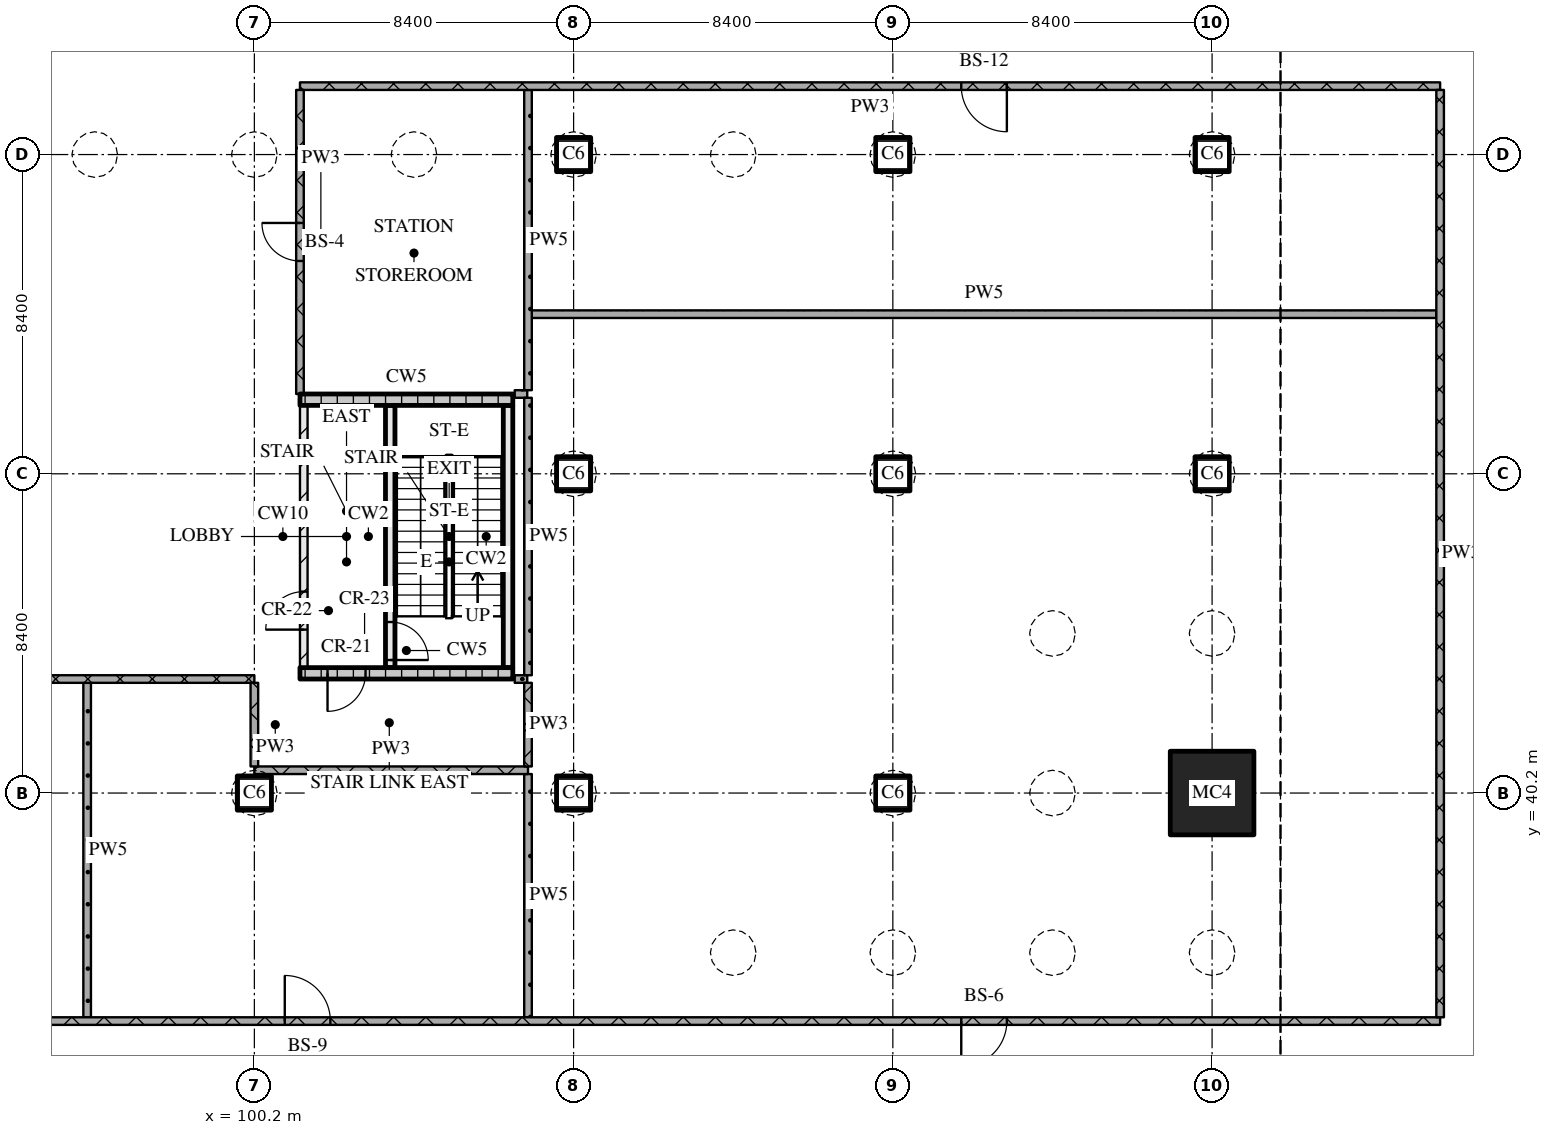
"""IFC4 building model, lengths in metres.
Left out: names, types, materials, properties, quantities, classifications, styles, units other than length and angle.
Written with IfcOpenShell. Run it as: python <this file> out.ifc"""

import sys

from ifc_helpers import new_model, si_unit, direction, frame, frame_2d, origin, origin_2d, place, context, subcontext, project, spatial, rectangle, extrude, element, fill, save


model = new_model("IFC4")
c1 = context("Model", 3, precision=1e-05, world=origin(), true_north=direction((0.0, 1.0)))
c2 = subcontext(c1, "Body", "Model", "MODEL_VIEW")
j1 = project(units=[si_unit("LENGTHUNIT", "METRE"), si_unit("PLANEANGLEUNIT", "RADIAN")], contexts=[c1])
p1 = place(None, origin())
s1 = spatial("IfcSite", under=j1, at=p1, CompositionType="ELEMENT")
p2 = place(p1, origin())
s2 = spatial("IfcBuilding", under=s1, at=p2, CompositionType="ELEMENT")
p3 = place(p2, frame((0.0, 0.0, -6.0)))
s3 = spatial("IfcBuildingStorey", under=s2, at=p3, CompositionType="ELEMENT", Elevation=-6.0)
for number, where, z_axis, x_axis in (
    (1, (100.2, 40.2, 0.0), (0.0, 0.0, 1.0), (1.0, 0.0, 0.0)),
    (2, (108.6, 40.2, 0.0), (0.0, 0.0, 1.0), (1.0, 0.0, 0.0)),
    (3, (108.6, 48.6, 0.0), (0.0, 0.0, 1.0), (1.0, 0.0, 0.0)),
    (4, (108.6, 57.0, 0.0), (0.0, 0.0, 1.0), (1.0, 0.0, 0.0)),
    (5, (117.0, 40.2, 0.0), (0.0, 0.0, 1.0), (1.0, 0.0, 0.0)),
    (6, (117.0, 48.6, 0.0), (0.0, 0.0, 1.0), (1.0, 0.0, 0.0)),
    (7, (117.0, 57.0, 0.0), (0.0, 0.0, 1.0), (1.0, 0.0, 0.0)),
):
    element("IfcColumn", number, at=place(p3, frame(where, z_axis=z_axis, x_axis=x_axis)), inside=s3, PredefinedType="COLUMN", context=c2, shape_type="SweptSolid", body=[
        extrude(rectangle(XDim=0.9, YDim=0.9, at=origin_2d()), origin(), (0.0, 0.0, 1.0), 6.0),
    ])
p4 = place(p3, frame((125.4, 40.2, 0.0), z_axis=(0.0, 0.0, 1.0), x_axis=(1.0, 0.0, 0.0)))
e8 = element("IfcColumn", 8, at=p4, inside=s3, PredefinedType="COLUMN", context=c2, shape_type="SweptSolid", body=[
    extrude(rectangle(XDim=2.2, YDim=2.2, at=origin_2d()), origin(), (0.0, 0.0, 1.0), 6.0),
])
for number, where, z_axis, x_axis in (
    (9, (125.4, 48.6, 0.0), (0.0, 0.0, 1.0), (1.0, 0.0, 0.0)),
    (10, (125.4, 57.0, 0.0), (0.0, 0.0, 1.0), (1.0, 0.0, 0.0)),
):
    element("IfcColumn", number, at=place(p3, frame(where, z_axis=z_axis, x_axis=x_axis)), inside=s3, PredefinedType="COLUMN", context=c2, shape_type="SweptSolid", body=[
        extrude(rectangle(XDim=0.9, YDim=0.9, at=origin_2d()), origin(), (0.0, 0.0, 1.0), 6.0),
    ])
p5 = place(p3, frame((101.4, 43.35, 0.0), z_axis=(0.0, 0.0, 1.0), x_axis=(1.0, 0.0, 0.0)))
e11 = element("IfcWall", 11, at=p5, inside=s3, PredefinedType="SOLIDWALL", context=c2, shape_type="SweptSolid", body=[
    extrude(rectangle(XDim=5.6, YDim=0.3, at=frame_2d((2.8, 0.0))), origin(), (0.0, 0.0, 1.0), 5.7),
])
p6 = place(p5, frame((0.725, 0.0, 0.0)))
e12 = element("IfcOpeningElement", 12, at=p6, cuts=e11, PredefinedType="OPENING", context=c2, shape_type="SweptSolid", body=[
    extrude(rectangle(XDim=1.0, YDim=2.1, at=frame_2d((0.5, 1.05))), frame((0.0, 0.16, 0.0), z_axis=(0.0, -1.0, 0.0), x_axis=(1.0, 0.0, 0.0)), (0.0, 0.0, 1.0), 0.32),
])
p7 = place(p3, frame((101.5, 43.5, 0.0), z_axis=(0.0, 0.0, 1.0), x_axis=(0.0, 1.0, 0.0)))
e13 = element("IfcWall", 13, at=p7, inside=s3, PredefinedType="PARTITIONING", context=c2, shape_type="SweptSolid", body=[
    extrude(rectangle(XDim=6.9, YDim=0.2, at=frame_2d((3.45, 0.0))), origin(), (0.0, 0.0, 1.0), 5.7),
])
p8 = place(p7, frame((1.0, 0.0, 0.0)))
e14 = element("IfcOpeningElement", 14, at=p8, cuts=e13, PredefinedType="OPENING", context=c2, shape_type="SweptSolid", body=[
    extrude(rectangle(XDim=1.0, YDim=2.1, at=frame_2d((0.5, 1.05))), frame((0.0, 0.11, 0.0), z_axis=(0.0, -1.0, 0.0), x_axis=(1.0, 0.0, 0.0)), (0.0, 0.0, 1.0), 0.22),
])
p9 = place(p3, frame((103.775, 43.5, 0.0), z_axis=(0.0, 0.0, 1.0), x_axis=(0.0, 1.0, 0.0)))
e15 = element("IfcWall", 15, at=p9, inside=s3, PredefinedType="SOLIDWALL", context=c2, shape_type="SweptSolid", body=[
    extrude(rectangle(XDim=6.9, YDim=0.25, at=frame_2d((3.45, 0.0))), origin(), (0.0, 0.0, 1.0), 5.7),
])
p10 = place(p9, frame((0.2, 0.0, 0.0)))
e16 = element("IfcOpeningElement", 16, at=p10, cuts=e15, PredefinedType="OPENING", context=c2, shape_type="SweptSolid", body=[
    extrude(rectangle(XDim=1.0, YDim=2.1, at=frame_2d((0.5, 1.05))), frame((0.0, 0.135, 0.0), z_axis=(0.0, -1.0, 0.0), x_axis=(1.0, 0.0, 0.0)), (0.0, 0.0, 1.0), 0.27),
])
p11 = place(p3, frame((106.875, 43.5, 0.0), z_axis=(0.0, 0.0, 1.0), x_axis=(0.0, 1.0, 0.0)))
e17 = element("IfcWall", 17, at=p11, inside=s3, PredefinedType="SOLIDWALL", context=c2, shape_type="SweptSolid", body=[
    extrude(rectangle(XDim=6.9, YDim=0.25, at=frame_2d((3.45, 0.0))), origin(), (0.0, 0.0, 1.0), 5.7),
])
p12 = place(p3, frame((101.4, 50.55, 0.0), z_axis=(0.0, 0.0, 1.0), x_axis=(1.0, 0.0, 0.0)))
e18 = element("IfcWall", 18, at=p12, inside=s3, PredefinedType="SOLIDWALL", context=c2, shape_type="SweptSolid", body=[
    extrude(rectangle(XDim=5.6, YDim=0.3, at=frame_2d((2.8, 0.0))), origin(), (0.0, 0.0, 1.0), 5.7),
])
p13 = place(p3, frame((43.8, 34.2, 0.0), z_axis=(0.0, 0.0, 1.0), x_axis=(1.0, 0.0, 0.0)))
e19 = element("IfcWall", 19, at=p13, inside=s3, PredefinedType="PARTITIONING", context=c2, shape_type="SweptSolid", body=[
    extrude(rectangle(XDim=87.6, YDim=0.2, at=frame_2d((43.8, 0.0))), origin(), (0.0, 0.0, 1.0), 5.7),
])
p14 = place(p13, frame((29.1, 0.0, 0.0)))
e20 = element("IfcOpeningElement", 20, at=p14, cuts=e19, PredefinedType="OPENING", context=c2, shape_type="SweptSolid", body=[
    extrude(rectangle(XDim=1.2, YDim=2.1, at=frame_2d((0.6, 1.05))), frame((0.0, 0.11, 0.0), z_axis=(0.0, -1.0, 0.0), x_axis=(1.0, 0.0, 0.0)), (0.0, 0.0, 1.0), 0.22),
])
p15 = place(p13, frame((43.1, 0.0, 0.0)))
e21 = element("IfcOpeningElement", 21, at=p15, cuts=e19, PredefinedType="OPENING", context=c2, shape_type="SweptSolid", body=[
    extrude(rectangle(XDim=1.2, YDim=2.1, at=frame_2d((0.6, 1.05))), frame((0.0, 0.11, 0.0), z_axis=(0.0, -1.0, 0.0), x_axis=(1.0, 0.0, 0.0)), (0.0, 0.0, 1.0), 0.22),
])
p16 = place(p13, frame((57.2, 0.0, 0.0)))
e22 = element("IfcOpeningElement", 22, at=p16, cuts=e19, PredefinedType="OPENING", context=c2, shape_type="SweptSolid", body=[
    extrude(rectangle(XDim=1.2, YDim=2.1, at=frame_2d((0.6, 1.05))), frame((0.0, 0.11, 0.0), z_axis=(0.0, -1.0, 0.0), x_axis=(1.0, 0.0, 0.0)), (0.0, 0.0, 1.0), 0.22),
])
p17 = place(p13, frame((75.0, 0.0, 0.0)))
e23 = element("IfcOpeningElement", 23, at=p17, cuts=e19, PredefinedType="OPENING", context=c2, shape_type="SweptSolid", body=[
    extrude(rectangle(XDim=1.2, YDim=2.1, at=frame_2d((0.6, 1.05))), frame((0.0, 0.11, 0.0), z_axis=(0.0, -1.0, 0.0), x_axis=(1.0, 0.0, 0.0)), (0.0, 0.0, 1.0), 0.22),
])
p18 = place(p3, frame((100.2, 40.8, 0.0), z_axis=(0.0, 0.0, 1.0), x_axis=(1.0, 0.0, 0.0)))
e24 = element("IfcWall", 24, at=p18, inside=s3, PredefinedType="PARTITIONING", context=c2, shape_type="SweptSolid", body=[
    extrude(rectangle(XDim=7.2, YDim=0.2, at=frame_2d((3.6, 0.0))), origin(), (0.0, 0.0, 1.0), 5.7),
])
p19 = place(p3, frame((75.0, 43.2, 0.0), z_axis=(0.0, 0.0, 1.0), x_axis=(1.0, 0.0, 0.0)))
e25 = element("IfcWall", 25, at=p19, inside=s3, PredefinedType="PARTITIONING", context=c2, shape_type="SweptSolid", body=[
    extrude(rectangle(XDim=25.2, YDim=0.2, at=frame_2d((12.6, 0.0))), origin(), (0.0, 0.0, 1.0), 5.7),
])
for number, where, z_axis, x_axis in (
    (26, (107.05, 43.2, 0.0), (0.0, 0.0, 1.0), (1.0, 0.0, 0.0)),
    (27, (107.05, 50.7, 0.0), (0.0, 0.0, 1.0), (1.0, 0.0, 0.0)),
):
    element("IfcWall", number, at=place(p3, frame(where, z_axis=z_axis, x_axis=x_axis)), inside=s3, PredefinedType="PARTITIONING", context=c2, shape_type="SweptSolid", body=[
        extrude(rectangle(XDim=0.33, YDim=0.2, at=frame_2d((0.165, 0.0))), origin(), (0.0, 0.0, 1.0), 5.7),
    ])
p20 = place(p3, frame((107.5, 52.8, 0.0), z_axis=(0.0, 0.0, 1.0), x_axis=(1.0, 0.0, 0.0)))
e28 = element("IfcWall", 28, at=p20, inside=s3, PredefinedType="PARTITIONING", context=c2, shape_type="SweptSolid", body=[
    extrude(rectangle(XDim=23.8, YDim=0.2, at=frame_2d((11.9, 0.0))), origin(), (0.0, 0.0, 1.0), 5.7),
])
p21 = place(p3, frame((131.4, 58.8, 0.0), z_axis=(0.0, 0.0, 1.0), x_axis=(-1.0, 0.0, 0.0)))
e29 = element("IfcWall", 29, at=p21, inside=s3, PredefinedType="PARTITIONING", context=c2, shape_type="SweptSolid", body=[
    extrude(rectangle(XDim=30.0, YDim=0.2, at=frame_2d((15.0, 0.0))), origin(), (0.0, 0.0, 1.0), 5.7),
])
p22 = place(p21, frame((11.4, 0.0, 0.0)))
e30 = element("IfcOpeningElement", 30, at=p22, cuts=e29, PredefinedType="OPENING", context=c2, shape_type="SweptSolid", body=[
    extrude(rectangle(XDim=1.2, YDim=2.1, at=frame_2d((0.6, 1.05))), frame((0.0, 0.11, 0.0), z_axis=(0.0, -1.0, 0.0), x_axis=(1.0, 0.0, 0.0)), (0.0, 0.0, 1.0), 0.22),
])
p23 = place(p3, frame((95.8, 43.1, 0.0), z_axis=(0.0, 0.0, 1.0), x_axis=(0.0, -1.0, 0.0)))
e31 = element("IfcWall", 31, at=p23, inside=s3, PredefinedType="PARTITIONING", context=c2, shape_type="SweptSolid", body=[
    extrude(rectangle(XDim=8.8, YDim=0.2, at=frame_2d((4.4, 0.0))), origin(), (0.0, 0.0, 1.0), 5.7),
])
p24 = place(p3, frame((100.2, 43.1, 0.0), z_axis=(0.0, 0.0, 1.0), x_axis=(0.0, -1.0, 0.0)))
e32 = element("IfcWall", 32, at=p24, inside=s3, PredefinedType="PARTITIONING", context=c2, shape_type="SweptSolid", body=[
    extrude(rectangle(XDim=2.2, YDim=0.2, at=frame_2d((1.1, 0.0))), origin(), (0.0, 0.0, 1.0), 5.7),
])
p25 = place(p3, frame((101.4, 58.7, 0.0), z_axis=(0.0, 0.0, 1.0), x_axis=(0.0, -1.0, 0.0)))
e33 = element("IfcWall", 33, at=p25, inside=s3, PredefinedType="PARTITIONING", context=c2, shape_type="SweptSolid", body=[
    extrude(rectangle(XDim=8.0, YDim=0.2, at=frame_2d((4.0, 0.0))), origin(), (0.0, 0.0, 1.0), 5.7),
])
p26 = place(p25, frame((3.5, 0.0, 0.0)))
e34 = element("IfcOpeningElement", 34, at=p26, cuts=e33, PredefinedType="OPENING", context=c2, shape_type="SweptSolid", body=[
    extrude(rectangle(XDim=1.0, YDim=2.1, at=frame_2d((0.5, 1.05))), frame((0.0, 0.11, 0.0), z_axis=(0.0, -1.0, 0.0), x_axis=(1.0, 0.0, 0.0)), (0.0, 0.0, 1.0), 0.22),
])
p27 = place(p3, frame((107.4, 43.1, 0.0), z_axis=(0.0, 0.0, 1.0), x_axis=(0.0, -1.0, 0.0)))
e35 = element("IfcWall", 35, at=p27, inside=s3, PredefinedType="PARTITIONING", context=c2, shape_type="SweptSolid", body=[
    extrude(rectangle(XDim=2.2, YDim=0.2, at=frame_2d((1.1, 0.0))), origin(), (0.0, 0.0, 1.0), 5.7),
])
p28 = place(p3, frame((107.4, 50.6, 0.0), z_axis=(0.0, 0.0, 1.0), x_axis=(0.0, -1.0, 0.0)))
e36 = element("IfcWall", 36, at=p28, inside=s3, PredefinedType="PARTITIONING", context=c2, shape_type="SweptSolid", body=[
    extrude(rectangle(XDim=7.3, YDim=0.2, at=frame_2d((3.65, 0.0))), origin(), (0.0, 0.0, 1.0), 5.7),
])
p29 = place(p3, frame((107.4, 40.7, 0.0), z_axis=(0.0, 0.0, 1.0), x_axis=(0.0, -1.0, 0.0)))
e37 = element("IfcWall", 37, at=p29, inside=s3, PredefinedType="PARTITIONING", context=c2, shape_type="SweptSolid", body=[
    extrude(rectangle(XDim=6.4, YDim=0.2, at=frame_2d((3.2, 0.0))), origin(), (0.0, 0.0, 1.0), 5.7),
])
p30 = place(p3, frame((107.4, 58.7, 0.0), z_axis=(0.0, 0.0, 1.0), x_axis=(0.0, -1.0, 0.0)))
e38 = element("IfcWall", 38, at=p30, inside=s3, PredefinedType="PARTITIONING", context=c2, shape_type="SweptSolid", body=[
    extrude(rectangle(XDim=7.9, YDim=0.2, at=frame_2d((3.95, 0.0))), origin(), (0.0, 0.0, 1.0), 5.7),
])
p31 = place(p3, frame((131.4, 58.7, 0.0), z_axis=(0.0, 0.0, 1.0), x_axis=(0.0, -1.0, 0.0)))
e39 = element("IfcWall", 39, at=p31, inside=s3, PredefinedType="PARTITIONING", context=c2, shape_type="SweptSolid", body=[
    extrude(rectangle(XDim=24.4, YDim=0.2, at=frame_2d((12.2, 0.0))), origin(), (0.0, 0.0, 1.0), 5.2),
])
p32 = place(p6, origin())
e40 = element("IfcDoor", 40, at=p32, inside=s3, OperationType="SINGLE_SWING_RIGHT", PredefinedType="DOOR", context=c2, shape_type="SweptSolid", body=[
    extrude(rectangle(XDim=1.0, YDim=2.1, at=frame_2d((0.5, 1.05))), frame((0.0, 0.025, 0.0), z_axis=(0.0, -1.0, 0.0), x_axis=(1.0, 0.0, 0.0)), (0.0, 0.0, 1.0), 0.05),
])
fill(e12, e40)
p33 = place(p10, origin())
e41 = element("IfcDoor", 41, at=p33, inside=s3, OperationType="SINGLE_SWING_RIGHT", PredefinedType="DOOR", context=c2, shape_type="SweptSolid", body=[
    extrude(rectangle(XDim=1.0, YDim=2.1, at=frame_2d((0.5, 1.05))), frame((0.0, 0.025, 0.0), z_axis=(0.0, -1.0, 0.0), x_axis=(1.0, 0.0, 0.0)), (0.0, 0.0, 1.0), 0.05),
])
fill(e16, e41)
p34 = place(p8, origin())
e42 = element("IfcDoor", 42, at=p34, inside=s3, OperationType="SINGLE_SWING_LEFT", PredefinedType="DOOR", context=c2, shape_type="SweptSolid", body=[
    extrude(rectangle(XDim=1.0, YDim=2.1, at=frame_2d((0.5, 1.05))), frame((0.0, 0.025, 0.0), z_axis=(0.0, -1.0, 0.0), x_axis=(1.0, 0.0, 0.0)), (0.0, 0.0, 1.0), 0.05),
])
fill(e14, e42)
p35 = place(p16, origin())
e43 = element("IfcDoor", 43, at=p35, inside=s3, OperationType="SINGLE_SWING_LEFT", PredefinedType="DOOR", context=c2, shape_type="SweptSolid", body=[
    extrude(rectangle(XDim=1.2, YDim=2.1, at=frame_2d((0.6, 1.05))), frame((0.0, 0.025, 0.0), z_axis=(0.0, -1.0, 0.0), x_axis=(1.0, 0.0, 0.0)), (0.0, 0.0, 1.0), 0.05),
])
fill(e22, e43)
p36 = place(p17, origin())
e44 = element("IfcDoor", 44, at=p36, inside=s3, OperationType="SINGLE_SWING_RIGHT", PredefinedType="DOOR", context=c2, shape_type="SweptSolid", body=[
    extrude(rectangle(XDim=1.2, YDim=2.1, at=frame_2d((0.6, 1.05))), frame((0.0, 0.025, 0.0), z_axis=(0.0, -1.0, 0.0), x_axis=(1.0, 0.0, 0.0)), (0.0, 0.0, 1.0), 0.05),
])
fill(e23, e44)
p37 = place(p22, origin())
e45 = element("IfcDoor", 45, at=p37, inside=s3, OperationType="SINGLE_SWING_LEFT", PredefinedType="DOOR", context=c2, shape_type="SweptSolid", body=[
    extrude(rectangle(XDim=1.2, YDim=2.1, at=frame_2d((0.6, 1.05))), frame((0.0, 0.025, 0.0), z_axis=(0.0, -1.0, 0.0), x_axis=(1.0, 0.0, 0.0)), (0.0, 0.0, 1.0), 0.05),
])
fill(e30, e45)
p38 = place(p26, origin())
e46 = element("IfcDoor", 46, at=p38, inside=s3, OperationType="SINGLE_SWING_RIGHT", PredefinedType="DOOR", context=c2, shape_type="SweptSolid", body=[
    extrude(rectangle(XDim=1.0, YDim=2.1, at=frame_2d((0.5, 1.05))), frame((0.0, 0.025, 0.0), z_axis=(0.0, -1.0, 0.0), x_axis=(1.0, 0.0, 0.0)), (0.0, 0.0, 1.0), 0.05),
])
fill(e34, e46)
save(model, sys.argv[1])
